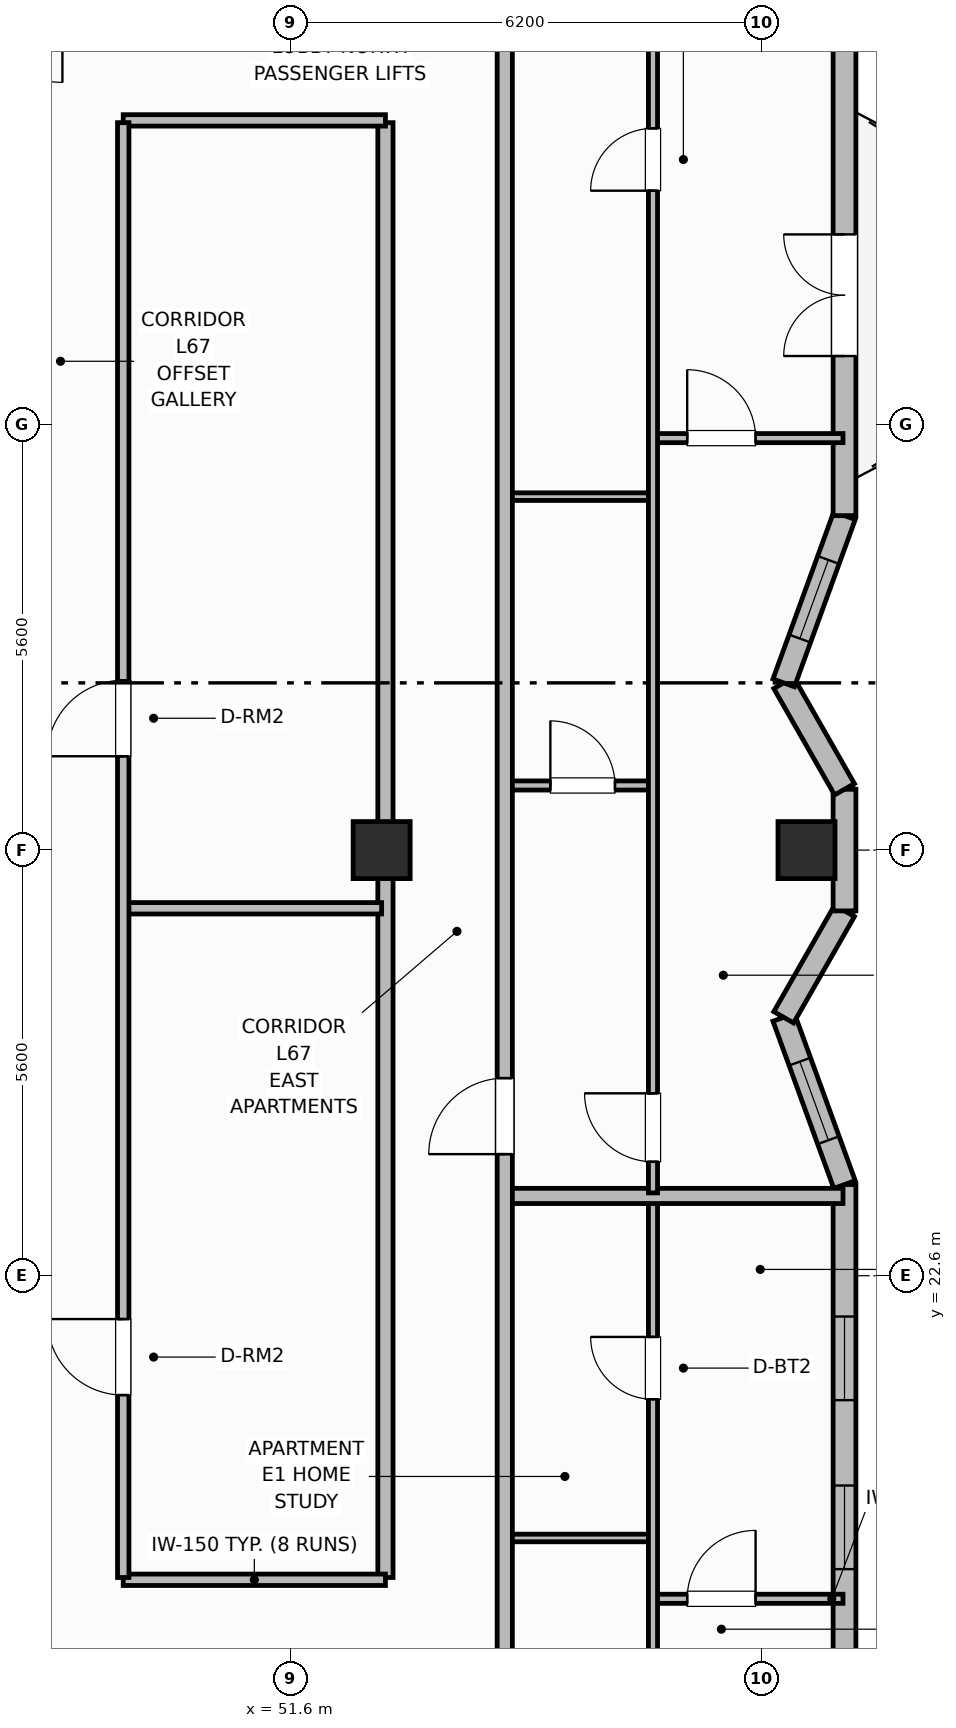
"""IFC4 building model, lengths in metres.
Left out: names, types, materials, properties, quantities, classifications, styles, units other than length and angle.
Written with IfcOpenShell. Run it as: python <this file> out.ifc"""

import sys

from ifc_helpers import new_model, si_unit, direction, frame, frame_2d, origin, origin_2d, place, context, subcontext, project, spatial, rectangle, extrude, element, fill, save


model = new_model("IFC4")
c1 = context("Model", 3, precision=1e-05, world=origin(), true_north=direction((0.0, 1.0)))
c2 = subcontext(c1, "Body", "Model", "MODEL_VIEW")
j1 = project(units=[si_unit("LENGTHUNIT", "METRE"), si_unit("PLANEANGLEUNIT", "RADIAN")], contexts=[c1])
p1 = place(None, origin())
s1 = spatial("IfcSite", under=j1, at=p1, CompositionType="ELEMENT")
p2 = place(p1, origin())
s2 = spatial("IfcBuilding", under=s1, at=p2, CompositionType="ELEMENT")
p3 = place(p2, frame((0.0, 0.0, 267.6)))
s3 = spatial("IfcBuildingStorey", under=s2, at=p3, CompositionType="ELEMENT", Elevation=267.6)
for number, where, z_axis, x_axis in (
    (1, (52.8, 28.2, 0.0), (0.0, 0.0, 1.0), (1.0, 0.0, 0.0)),
    (2, (58.39, 28.2, 0.0), (0.0, 0.0, 1.0), (1.0, 0.0, 0.0)),
):
    element("IfcColumn", number, at=place(p3, frame(where, z_axis=z_axis, x_axis=x_axis)), inside=s3, PredefinedType="COLUMN", context=c2, shape_type="SweptSolid", body=[
        extrude(rectangle(XDim=0.75, YDim=0.75, at=origin_2d()), origin(), (0.0, 0.0, 1.0), 3.7),
    ])
p4 = place(p3, frame((58.89, 12.68, 0.0), z_axis=(0.0, 0.0, 1.0), x_axis=(0.0, 1.0, 0.0)))
e3 = element("IfcWall", 3, at=p4, inside=s3, PredefinedType="SOLIDWALL", context=c2, shape_type="SweptSolid", body=[
    extrude(rectangle(XDim=11.12, YDim=0.3, at=frame_2d((5.56, 0.0))), origin(), (0.0, 0.0, 1.0), 2.73),
])
p5 = place(p4, frame((1.737, 0.0, 0.95)))
e4 = element("IfcOpeningElement", 4, at=p5, cuts=e3, PredefinedType="OPENING", context=c2, shape_type="SweptSolid", body=[
    extrude(rectangle(XDim=1.1, YDim=1.65, at=frame_2d((0.55, 0.825))), frame((0.0, 0.16, 0.0), z_axis=(0.0, -1.0, 0.0), x_axis=(1.0, 0.0, 0.0)), (0.0, 0.0, 1.0), 0.32),
])
p6 = place(p4, frame((6.06, 0.0, 0.95)))
e5 = element("IfcOpeningElement", 5, at=p6, cuts=e3, PredefinedType="OPENING", context=c2, shape_type="SweptSolid", body=[
    extrude(rectangle(XDim=1.1, YDim=1.65, at=frame_2d((0.55, 0.825))), frame((0.0, 0.16, 0.0), z_axis=(0.0, -1.0, 0.0), x_axis=(1.0, 0.0, 0.0)), (0.0, 0.0, 1.0), 0.32),
])
p7 = place(p4, frame((8.283, 0.0, 0.95)))
e6 = element("IfcOpeningElement", 6, at=p7, cuts=e3, PredefinedType="OPENING", context=c2, shape_type="SweptSolid", body=[
    extrude(rectangle(XDim=1.1, YDim=1.65, at=frame_2d((0.55, 0.825))), frame((0.0, 0.16, 0.0), z_axis=(0.0, -1.0, 0.0), x_axis=(1.0, 0.0, 0.0)), (0.0, 0.0, 1.0), 0.32),
])
p8 = place(p3, frame((58.89, 23.8, 0.0), z_axis=(0.0, 0.0, 1.0), x_axis=(-0.341676068702, 0.939817782379, 0.0)))
e7 = element("IfcWall", 7, at=p8, inside=s3, PredefinedType="SOLIDWALL", context=c2, shape_type="SweptSolid", body=[
    extrude(rectangle(XDim=2.341, YDim=0.3, at=frame_2d((1.17, 0.0))), origin(), (0.0, 0.0, 1.0), 2.73),
])
p9 = place(p8, frame((0.621, 0.0, 0.92)))
e8 = element("IfcOpeningElement", 8, at=p9, cuts=e7, PredefinedType="OPENING", context=c2, shape_type="SweptSolid", body=[
    extrude(rectangle(XDim=1.1, YDim=1.65, at=frame_2d((0.55, 0.825))), frame((0.0, 0.16, 0.0), z_axis=(0.0, -1.0, 0.0), x_axis=(1.0, 0.0, 0.0)), (0.0, 0.0, 1.0), 0.32),
])
p10 = place(p3, frame((58.09, 26.0, 0.0), z_axis=(0.0, 0.0, 1.0), x_axis=(0.496073707015, 0.868280413927, 0.0)))
e9 = element("IfcWall", 9, at=p10, inside=s3, PredefinedType="SOLIDWALL", context=c2, shape_type="SweptSolid", body=[
    extrude(rectangle(XDim=1.612, YDim=0.3, at=frame_2d((0.806, 0.0))), origin(), (0.0, 0.0, 1.0), 2.73),
])
p11 = place(p3, frame((58.89, 27.4, 0.0), z_axis=(0.0, 0.0, 1.0), x_axis=(0.0, 1.0, 0.0)))
e10 = element("IfcWall", 10, at=p11, inside=s3, PredefinedType="SOLIDWALL", context=c2, shape_type="SweptSolid", body=[
    extrude(rectangle(XDim=1.6, YDim=0.3, at=frame_2d((0.8, 0.0))), origin(), (0.0, 0.0, 1.0), 2.73),
])
p12 = place(p3, frame((58.89, 29.0, 0.0), z_axis=(0.0, 0.0, 1.0), x_axis=(-0.496073707015, 0.868280413927, 0.0)))
e11 = element("IfcWall", 11, at=p12, inside=s3, PredefinedType="SOLIDWALL", context=c2, shape_type="SweptSolid", body=[
    extrude(rectangle(XDim=1.612, YDim=0.3, at=frame_2d((0.806, 0.0))), origin(), (0.0, 0.0, 1.0), 2.73),
])
p13 = place(p3, frame((58.09, 30.4, 0.0), z_axis=(0.0, 0.0, 1.0), x_axis=(0.341642580708, 0.939829956453, 0.0)))
e12 = element("IfcWall", 12, at=p13, inside=s3, PredefinedType="SOLIDWALL", context=c2, shape_type="SweptSolid", body=[
    extrude(rectangle(XDim=2.341, YDim=0.3, at=frame_2d((1.17, 0.0))), origin(), (0.0, 0.0, 1.0), 2.73),
])
p14 = place(p13, frame((0.621, 0.0, 0.92)))
e13 = element("IfcOpeningElement", 13, at=p14, cuts=e12, PredefinedType="OPENING", context=c2, shape_type="SweptSolid", body=[
    extrude(rectangle(XDim=1.1, YDim=1.65, at=frame_2d((0.55, 0.825))), frame((0.0, 0.16, 0.0), z_axis=(0.0, -1.0, 0.0), x_axis=(1.0, 0.0, 0.0)), (0.0, 0.0, 1.0), 0.32),
])
p15 = place(p3, frame((58.89, 32.6, 0.0), z_axis=(0.0, 0.0, 1.0), x_axis=(0.0, 1.0, 0.0)))
e14 = element("IfcWall", 14, at=p15, inside=s3, PredefinedType="SOLIDWALL", context=c2, shape_type="SweptSolid", body=[
    extrude(rectangle(XDim=11.12, YDim=0.3, at=frame_2d((5.56, 0.0))), origin(), (0.0, 0.0, 1.0), 2.73),
])
p16 = place(p15, frame((2.1, 0.0, 0.0)))
e15 = element("IfcOpeningElement", 15, at=p16, cuts=e14, PredefinedType="OPENING", context=c2, shape_type="SweptSolid", body=[
    extrude(rectangle(XDim=1.6, YDim=2.1, at=frame_2d((0.8, 1.05))), frame((0.0, 0.16, 0.0), z_axis=(0.0, -1.0, 0.0), x_axis=(1.0, 0.0, 0.0)), (0.0, 0.0, 1.0), 0.32),
])
p17 = place(p3, frame((52.85, 18.63, 0.0), z_axis=(0.0, 0.0, 1.0), x_axis=(0.0, 1.0, 0.0)))
e16 = element("IfcWall", 16, at=p17, inside=s3, PredefinedType="PARTITIONING", context=c2, shape_type="SweptSolid", body=[
    extrude(rectangle(XDim=19.14, YDim=0.2, at=frame_2d((9.57, 0.0))), origin(), (0.0, 0.0, 1.0), 2.56),
])
for number, where, z_axis, x_axis in (
    (17, (49.4, 18.6, 0.0), (0.0, 0.0, 1.0), (1.0, 0.0, 0.0)),
    (18, (49.4, 37.8, 0.0), (0.0, 0.0, 1.0), (1.0, 0.0, 0.0)),
):
    element("IfcWall", number, at=place(p3, frame(where, z_axis=z_axis, x_axis=x_axis)), inside=s3, PredefinedType="PARTITIONING", context=c2, shape_type="SweptSolid", body=[
        extrude(rectangle(XDim=3.45, YDim=0.15, at=frame_2d((1.725, 0.0))), origin(), (0.0, 0.0, 1.0), 2.56),
    ])
p18 = place(p3, frame((49.43, 27.434, 0.0), z_axis=(0.0, 0.0, 1.0), x_axis=(1.0, 0.0, 0.0)))
e19 = element("IfcWall", 19, at=p18, inside=s3, PredefinedType="PARTITIONING", context=c2, shape_type="SweptSolid", body=[
    extrude(rectangle(XDim=3.37, YDim=0.15, at=frame_2d((1.685, 0.0))), origin(), (0.0, 0.0, 1.0), 2.56),
])
p19 = place(p3, frame((49.4, 18.63, 0.0), z_axis=(0.0, 0.0, 1.0), x_axis=(0.0, 1.0, 0.0)))
e20 = element("IfcWall", 20, at=p19, inside=s3, PredefinedType="PARTITIONING", context=c2, shape_type="SweptSolid", body=[
    extrude(rectangle(XDim=19.14, YDim=0.15, at=frame_2d((9.57, 0.0))), origin(), (0.0, 0.0, 1.0), 2.56),
])
p20 = place(p19, frame((2.4, 0.0, 0.0)))
e21 = element("IfcOpeningElement", 21, at=p20, cuts=e20, PredefinedType="OPENING", context=c2, shape_type="SweptSolid", body=[
    extrude(rectangle(XDim=1.0, YDim=2.15, at=frame_2d((0.5, 1.075))), frame((0.0, 0.085, 0.0), z_axis=(0.0, -1.0, 0.0), x_axis=(1.0, 0.0, 0.0)), (0.0, 0.0, 1.0), 0.17),
])
p21 = place(p19, frame((10.804, 0.0, 0.0)))
e22 = element("IfcOpeningElement", 22, at=p21, cuts=e20, PredefinedType="OPENING", context=c2, shape_type="SweptSolid", body=[
    extrude(rectangle(XDim=1.0, YDim=2.15, at=frame_2d((0.5, 1.075))), frame((0.0, 0.085, 0.0), z_axis=(0.0, -1.0, 0.0), x_axis=(1.0, 0.0, 0.0)), (0.0, 0.0, 1.0), 0.17),
])
p22 = place(p3, frame((54.42, 19.15, 0.0), z_axis=(0.0, 0.0, 1.0), x_axis=(1.0, 0.0, 0.0)))
e23 = element("IfcWall", 23, at=p22, inside=s3, PredefinedType="PARTITIONING", context=c2, shape_type="SweptSolid", body=[
    extrude(rectangle(XDim=1.95, YDim=0.1, at=frame_2d((0.975, 0.0))), origin(), (0.0, 0.0, 1.0), 2.56),
])
p23 = place(p3, frame((56.37, 18.35, 0.0), z_axis=(0.0, 0.0, 1.0), x_axis=(1.0, 0.0, 0.0)))
e24 = element("IfcWall", 24, at=p23, inside=s3, PredefinedType="PARTITIONING", context=c2, shape_type="SweptSolid", body=[
    extrude(rectangle(XDim=2.5, YDim=0.12, at=frame_2d((1.25, 0.0))), origin(), (0.0, 0.0, 1.0), 2.56),
])
p24 = place(p23, frame((0.45, 0.0, 0.0)))
e25 = element("IfcOpeningElement", 25, at=p24, cuts=e24, PredefinedType="OPENING", context=c2, shape_type="SweptSolid", body=[
    extrude(rectangle(XDim=0.9, YDim=2.1, at=frame_2d((0.45, 1.05))), frame((0.0, 0.07, 0.0), z_axis=(0.0, -1.0, 0.0), x_axis=(1.0, 0.0, 0.0)), (0.0, 0.0, 1.0), 0.14),
])
p25 = place(p3, frame((56.37, 9.99, 0.0), z_axis=(0.0, 0.0, 1.0), x_axis=(0.0, 1.0, 0.0)))
e26 = element("IfcWall", 26, at=p25, inside=s3, PredefinedType="PARTITIONING", context=c2, shape_type="SweptSolid", body=[
    extrude(rectangle(XDim=13.62, YDim=0.12, at=frame_2d((6.81, 0.0))), origin(), (0.0, 0.0, 1.0), 2.56),
])
p26 = place(p25, frame((0.41, 0.0, 0.0)))
e27 = element("IfcOpeningElement", 27, at=p26, cuts=e26, PredefinedType="OPENING", context=c2, shape_type="SweptSolid", body=[
    extrude(rectangle(XDim=0.9, YDim=2.1, at=frame_2d((0.45, 1.05))), frame((0.0, 0.07, 0.0), z_axis=(0.0, -1.0, 0.0), x_axis=(1.0, 0.0, 0.0)), (0.0, 0.0, 1.0), 0.14),
])
p27 = place(p25, frame((10.985, 0.0, 0.0)))
e28 = element("IfcOpeningElement", 28, at=p27, cuts=e26, PredefinedType="OPENING", context=c2, shape_type="SweptSolid", body=[
    extrude(rectangle(XDim=0.82, YDim=2.08, at=frame_2d((0.41, 1.04))), frame((0.0, 0.07, 0.0), z_axis=(0.0, -1.0, 0.0), x_axis=(1.0, 0.0, 0.0)), (0.0, 0.0, 1.0), 0.14),
])
p28 = place(p3, frame((54.42, 23.65, 0.0), z_axis=(0.0, 0.0, 1.0), x_axis=(1.0, 0.0, 0.0)))
e29 = element("IfcWall", 29, at=p28, inside=s3, PredefinedType="PARTITIONING", context=c2, shape_type="SweptSolid", body=[
    extrude(rectangle(XDim=4.45, YDim=0.2, at=frame_2d((2.225, 0.0))), origin(), (0.0, 0.0, 1.0), 2.56),
])
p29 = place(p3, frame((54.42, 29.05, 0.0), z_axis=(0.0, 0.0, 1.0), x_axis=(1.0, 0.0, 0.0)))
e30 = element("IfcWall", 30, at=p29, inside=s3, PredefinedType="PARTITIONING", context=c2, shape_type="SweptSolid", body=[
    extrude(rectangle(XDim=1.95, YDim=0.12, at=frame_2d((0.975, 0.0))), origin(), (0.0, 0.0, 1.0), 2.56),
])
p30 = place(p29, frame((0.6, 0.0, 0.0)))
e31 = element("IfcOpeningElement", 31, at=p30, cuts=e30, PredefinedType="OPENING", context=c2, shape_type="SweptSolid", body=[
    extrude(rectangle(XDim=0.85, YDim=2.1, at=frame_2d((0.425, 1.05))), frame((0.0, 0.07, 0.0), z_axis=(0.0, -1.0, 0.0), x_axis=(1.0, 0.0, 0.0)), (0.0, 0.0, 1.0), 0.14),
])
p31 = place(p3, frame((54.42, 32.85, 0.0), z_axis=(0.0, 0.0, 1.0), x_axis=(1.0, 0.0, 0.0)))
e32 = element("IfcWall", 32, at=p31, inside=s3, PredefinedType="PARTITIONING", context=c2, shape_type="SweptSolid", body=[
    extrude(rectangle(XDim=1.95, YDim=0.1, at=frame_2d((0.975, 0.0))), origin(), (0.0, 0.0, 1.0), 2.56),
])
p32 = place(p3, frame((56.37, 33.62, 0.0), z_axis=(0.0, 0.0, 1.0), x_axis=(1.0, 0.0, 0.0)))
e33 = element("IfcWall", 33, at=p32, inside=s3, PredefinedType="PARTITIONING", context=c2, shape_type="SweptSolid", body=[
    extrude(rectangle(XDim=2.5, YDim=0.12, at=frame_2d((1.25, 0.0))), origin(), (0.0, 0.0, 1.0), 2.56),
])
p33 = place(p32, frame((0.45, 0.0, 0.0)))
e34 = element("IfcOpeningElement", 34, at=p33, cuts=e33, PredefinedType="OPENING", context=c2, shape_type="SweptSolid", body=[
    extrude(rectangle(XDim=0.9, YDim=2.1, at=frame_2d((0.45, 1.05))), frame((0.0, 0.07, 0.0), z_axis=(0.0, -1.0, 0.0), x_axis=(1.0, 0.0, 0.0)), (0.0, 0.0, 1.0), 0.14),
])
p34 = place(p3, frame((56.37, 23.69, 0.0), z_axis=(0.0, 0.0, 1.0), x_axis=(0.0, 1.0, 0.0)))
e35 = element("IfcWall", 35, at=p34, inside=s3, PredefinedType="PARTITIONING", context=c2, shape_type="SweptSolid", body=[
    extrude(rectangle(XDim=22.72, YDim=0.12, at=frame_2d((11.36, 0.0))), origin(), (0.0, 0.0, 1.0), 2.56),
])
p35 = place(p34, frame((0.41, 0.0, 0.0)))
e36 = element("IfcOpeningElement", 36, at=p35, cuts=e35, PredefinedType="OPENING", context=c2, shape_type="SweptSolid", body=[
    extrude(rectangle(XDim=0.9, YDim=2.1, at=frame_2d((0.45, 1.05))), frame((0.0, 0.07, 0.0), z_axis=(0.0, -1.0, 0.0), x_axis=(1.0, 0.0, 0.0)), (0.0, 0.0, 1.0), 0.14),
])
p36 = place(p34, frame((13.185, 0.0, 0.0)))
e37 = element("IfcOpeningElement", 37, at=p36, cuts=e35, PredefinedType="OPENING", context=c2, shape_type="SweptSolid", body=[
    extrude(rectangle(XDim=0.82, YDim=2.08, at=frame_2d((0.41, 1.04))), frame((0.0, 0.07, 0.0), z_axis=(0.0, -1.0, 0.0), x_axis=(1.0, 0.0, 0.0)), (0.0, 0.0, 1.0), 0.14),
])
p37 = place(p3, frame((54.42, 9.95, 0.0), z_axis=(0.0, 0.0, 1.0), x_axis=(0.0, 1.0, 0.0)))
e38 = element("IfcWall", 38, at=p37, inside=s3, PredefinedType="PARTITIONING", context=c2, shape_type="SweptSolid", body=[
    extrude(rectangle(XDim=36.5, YDim=0.2, at=frame_2d((18.25, 0.0))), origin(), (0.0, 0.0, 1.0), 2.56),
])
p38 = place(p37, frame((3.25, 0.0, 0.0)))
e39 = element("IfcOpeningElement", 39, at=p38, cuts=e38, PredefinedType="OPENING", context=c2, shape_type="SweptSolid", body=[
    extrude(rectangle(XDim=1.0, YDim=2.15, at=frame_2d((0.5, 1.075))), frame((0.0, 0.11, 0.0), z_axis=(0.0, -1.0, 0.0), x_axis=(1.0, 0.0, 0.0)), (0.0, 0.0, 1.0), 0.22),
])
p39 = place(p37, frame((14.25, 0.0, 0.0)))
e40 = element("IfcOpeningElement", 40, at=p39, cuts=e38, PredefinedType="OPENING", context=c2, shape_type="SweptSolid", body=[
    extrude(rectangle(XDim=1.0, YDim=2.15, at=frame_2d((0.5, 1.075))), frame((0.0, 0.11, 0.0), z_axis=(0.0, -1.0, 0.0), x_axis=(1.0, 0.0, 0.0)), (0.0, 0.0, 1.0), 0.22),
])
p40 = place(p6, origin())
e41 = element("IfcWindow", 41, at=p40, inside=s3, PartitioningType="SINGLE_PANEL", PredefinedType="WINDOW", context=c2, shape_type="SweptSolid", body=[
    extrude(rectangle(XDim=1.1, YDim=1.65, at=frame_2d((0.55, 0.825))), frame((0.0, 0.03, 0.0), z_axis=(0.0, -1.0, 0.0), x_axis=(1.0, 0.0, 0.0)), (0.0, 0.0, 1.0), 0.06),
])
fill(e5, e41)
p41 = place(p7, origin())
e42 = element("IfcWindow", 42, at=p41, inside=s3, PartitioningType="SINGLE_PANEL", PredefinedType="WINDOW", context=c2, shape_type="SweptSolid", body=[
    extrude(rectangle(XDim=1.1, YDim=1.65, at=frame_2d((0.55, 0.825))), frame((0.0, 0.03, 0.0), z_axis=(0.0, -1.0, 0.0), x_axis=(1.0, 0.0, 0.0)), (0.0, 0.0, 1.0), 0.06),
])
fill(e6, e42)
p42 = place(p9, origin())
e43 = element("IfcWindow", 43, at=p42, inside=s3, PartitioningType="SINGLE_PANEL", PredefinedType="WINDOW", context=c2, shape_type="SweptSolid", body=[
    extrude(rectangle(XDim=1.1, YDim=1.65, at=frame_2d((0.55, 0.825))), frame((0.0, 0.03, 0.0), z_axis=(0.0, -1.0, 0.0), x_axis=(1.0, 0.0, 0.0)), (0.0, 0.0, 1.0), 0.06),
])
fill(e8, e43)
p43 = place(p14, origin())
e44 = element("IfcWindow", 44, at=p43, inside=s3, PartitioningType="SINGLE_PANEL", PredefinedType="WINDOW", context=c2, shape_type="SweptSolid", body=[
    extrude(rectangle(XDim=1.1, YDim=1.65, at=frame_2d((0.55, 0.825))), frame((0.0, 0.03, 0.0), z_axis=(0.0, -1.0, 0.0), x_axis=(1.0, 0.0, 0.0)), (0.0, 0.0, 1.0), 0.06),
])
fill(e13, e44)
p44 = place(p16, origin())
e45 = element("IfcDoor", 45, at=p44, inside=s3, OperationType="DOUBLE_DOOR_SINGLE_SWING", PredefinedType="DOOR", context=c2, shape_type="SweptSolid", body=[
    extrude(rectangle(XDim=1.6, YDim=2.1, at=frame_2d((0.8, 1.05))), frame((0.0, 0.025, 0.0), z_axis=(0.0, -1.0, 0.0), x_axis=(1.0, 0.0, 0.0)), (0.0, 0.0, 1.0), 0.05),
])
fill(e15, e45)
p45 = place(p20, origin())
e46 = element("IfcDoor", 46, at=p45, inside=s3, OperationType="SINGLE_SWING_RIGHT", PredefinedType="DOOR", context=c2, shape_type="SweptSolid", body=[
    extrude(rectangle(XDim=1.0, YDim=2.15, at=frame_2d((0.5, 1.075))), frame((0.0, 0.025, 0.0), z_axis=(0.0, -1.0, 0.0), x_axis=(1.0, 0.0, 0.0)), (0.0, 0.0, 1.0), 0.05),
])
fill(e21, e46)
p46 = place(p21, origin())
e47 = element("IfcDoor", 47, at=p46, inside=s3, OperationType="SINGLE_SWING_LEFT", PredefinedType="DOOR", context=c2, shape_type="SweptSolid", body=[
    extrude(rectangle(XDim=1.0, YDim=2.15, at=frame_2d((0.5, 1.075))), frame((0.0, 0.025, 0.0), z_axis=(0.0, -1.0, 0.0), x_axis=(1.0, 0.0, 0.0)), (0.0, 0.0, 1.0), 0.05),
])
fill(e22, e47)
p47 = place(p24, origin())
e48 = element("IfcDoor", 48, at=p47, inside=s3, OperationType="SINGLE_SWING_RIGHT", PredefinedType="DOOR", context=c2, shape_type="SweptSolid", body=[
    extrude(rectangle(XDim=0.9, YDim=2.1, at=frame_2d((0.45, 1.05))), frame((0.0, 0.025, 0.0), z_axis=(0.0, -1.0, 0.0), x_axis=(1.0, 0.0, 0.0)), (0.0, 0.0, 1.0), 0.05),
])
fill(e25, e48)
p48 = place(p27, origin())
e49 = element("IfcDoor", 49, at=p48, inside=s3, OperationType="SINGLE_SWING_RIGHT", PredefinedType="DOOR", context=c2, shape_type="SweptSolid", body=[
    extrude(rectangle(XDim=0.82, YDim=2.08, at=frame_2d((0.41, 1.04))), frame((0.0, 0.025, 0.0), z_axis=(0.0, -1.0, 0.0), x_axis=(1.0, 0.0, 0.0)), (0.0, 0.0, 1.0), 0.05),
])
fill(e28, e49)
p49 = place(p30, origin())
e50 = element("IfcDoor", 50, at=p49, inside=s3, OperationType="SINGLE_SWING_LEFT", PredefinedType="DOOR", context=c2, shape_type="SweptSolid", body=[
    extrude(rectangle(XDim=0.85, YDim=2.1, at=frame_2d((0.425, 1.05))), frame((0.0, 0.025, 0.0), z_axis=(0.0, -1.0, 0.0), x_axis=(1.0, 0.0, 0.0)), (0.0, 0.0, 1.0), 0.05),
])
fill(e31, e50)
p50 = place(p33, origin())
e51 = element("IfcDoor", 51, at=p50, inside=s3, OperationType="SINGLE_SWING_LEFT", PredefinedType="DOOR", context=c2, shape_type="SweptSolid", body=[
    extrude(rectangle(XDim=0.9, YDim=2.1, at=frame_2d((0.45, 1.05))), frame((0.0, 0.025, 0.0), z_axis=(0.0, -1.0, 0.0), x_axis=(1.0, 0.0, 0.0)), (0.0, 0.0, 1.0), 0.05),
])
fill(e34, e51)
p51 = place(p35, origin())
e52 = element("IfcDoor", 52, at=p51, inside=s3, OperationType="SINGLE_SWING_RIGHT", PredefinedType="DOOR", context=c2, shape_type="SweptSolid", body=[
    extrude(rectangle(XDim=0.9, YDim=2.1, at=frame_2d((0.45, 1.05))), frame((0.0, 0.025, 0.0), z_axis=(0.0, -1.0, 0.0), x_axis=(1.0, 0.0, 0.0)), (0.0, 0.0, 1.0), 0.05),
])
fill(e36, e52)
p52 = place(p36, origin())
e53 = element("IfcDoor", 53, at=p52, inside=s3, OperationType="SINGLE_SWING_LEFT", PredefinedType="DOOR", context=c2, shape_type="SweptSolid", body=[
    extrude(rectangle(XDim=0.82, YDim=2.08, at=frame_2d((0.41, 1.04))), frame((0.0, 0.025, 0.0), z_axis=(0.0, -1.0, 0.0), x_axis=(1.0, 0.0, 0.0)), (0.0, 0.0, 1.0), 0.05),
])
fill(e37, e53)
p53 = place(p39, origin())
e54 = element("IfcDoor", 54, at=p53, inside=s3, OperationType="SINGLE_SWING_LEFT", PredefinedType="DOOR", context=c2, shape_type="SweptSolid", body=[
    extrude(rectangle(XDim=1.0, YDim=2.15, at=frame_2d((0.5, 1.075))), frame((0.0, 0.025, 0.0), z_axis=(0.0, -1.0, 0.0), x_axis=(1.0, 0.0, 0.0)), (0.0, 0.0, 1.0), 0.05),
])
fill(e40, e54)
save(model, sys.argv[1])
